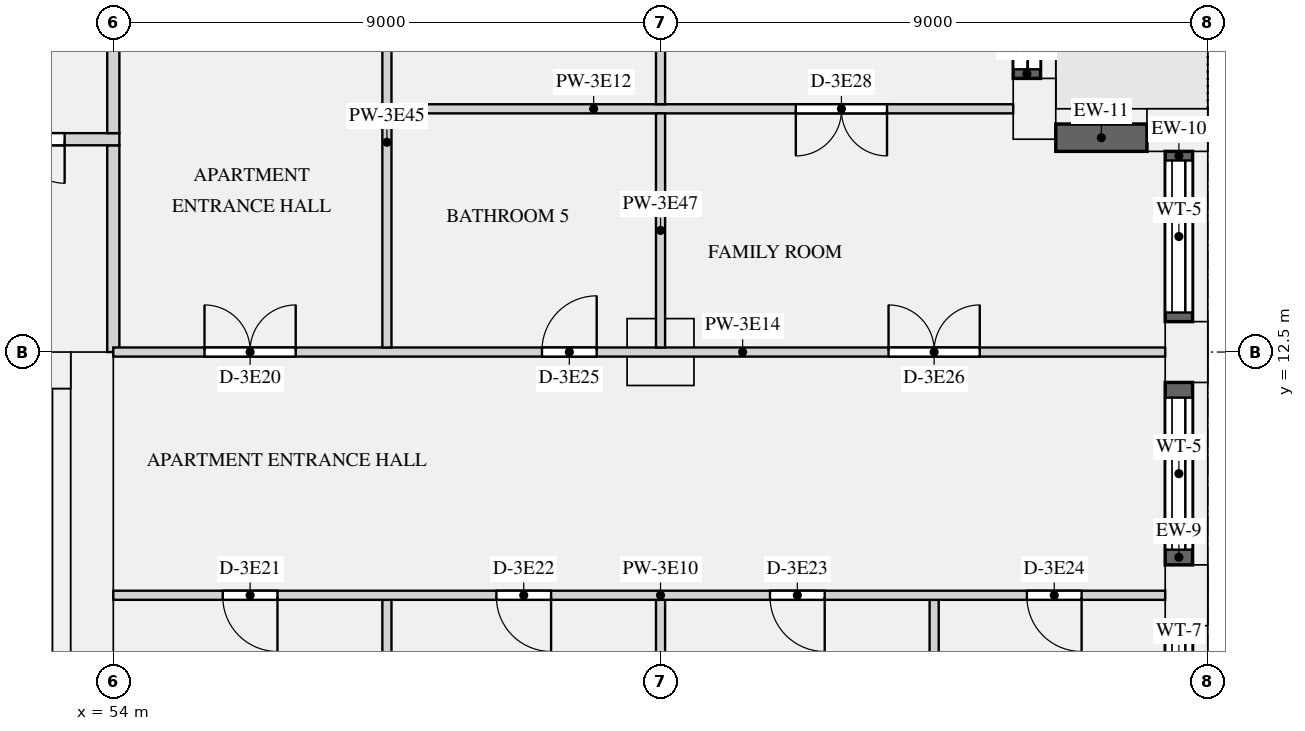
"""IFC4 building model, lengths in metres.
Left out: names, types, materials, properties, quantities, classifications, styles, units other than length and angle.
Written with IfcOpenShell. Run it as: python <this file> out.ifc"""

import sys

from ifc_helpers import new_model, si_unit, direction, frame, frame_2d, origin, origin_2d, place, context, subcontext, project, spatial, rectangle, extrude, element, fill, save


model = new_model("IFC4")
c1 = context("Model", 3, precision=1e-05, world=origin(), true_north=direction((0.0, 1.0)))
c2 = subcontext(c1, "Body", "Model", "MODEL_VIEW")
j1 = project(units=[si_unit("LENGTHUNIT", "METRE"), si_unit("PLANEANGLEUNIT", "RADIAN")], contexts=[c1])
p1 = place(None, origin())
s1 = spatial("IfcSite", under=j1, at=p1, CompositionType="ELEMENT")
p2 = place(p1, origin())
s2 = spatial("IfcBuilding", under=s1, at=p2, CompositionType="ELEMENT")
p3 = place(p2, frame((0.0, 0.0, 172.8)))
s3 = spatial("IfcBuildingStorey", under=s2, at=p3, CompositionType="ELEMENT", Elevation=172.8)
for number, where, z_axis, x_axis in (
    (1, (71.65, 8.5, 0.0), (0.0, 0.0, 1.0), (0.0, 1.0, 0.0)),
    (2, (71.65, 12.5, 0.0), (0.0, 0.0, 1.0), (0.0, 1.0, 0.0)),
    (3, (71.5, 16.15, 0.0), (0.0, 0.0, 1.0), (-1.0, 0.0, 0.0)),
    (4, (69.15, 16.5, 0.0), (0.0, 0.0, 1.0), (0.0, 1.0, 0.0)),
):
    element("IfcColumn", number, at=place(p3, frame(where, z_axis=z_axis, x_axis=x_axis)), inside=s3, PredefinedType="USERDEFINED", context=c2, shape_type="SweptSolid", body=[
        extrude(rectangle(XDim=1.0, YDim=0.7, at=origin_2d()), origin(), (0.0, 0.0, 1.0), 3.15),
    ])
p4 = place(p3, frame((63.0, 12.5, 0.0), z_axis=(0.0, 0.0, 1.0), x_axis=(1.0, 0.0, 0.0)))
e5 = element("IfcColumn", 5, at=p4, inside=s3, PredefinedType="COLUMN", context=c2, shape_type="SweptSolid", body=[
    extrude(rectangle(XDim=1.1, YDim=1.1, at=origin_2d()), origin(), (0.0, 0.0, 1.0), 3.15),
])
p5 = place(p3, frame((53.65, 0.0, 0.0), z_axis=(0.0, 0.0, 1.0), x_axis=(0.0, 1.0, 0.0)))
e6 = element("IfcWall", 6, at=p5, inside=s3, PredefinedType="SHEAR", context=c2, shape_type="SweptSolid", body=[
    extrude(rectangle(XDim=12.5, YDim=0.7, at=frame_2d((6.25, 0.0))), origin(), (0.0, 0.0, 1.0), 3.15),
])
p6 = place(p3, frame((18.7, 12.2, 0.0), z_axis=(0.0, 0.0, 1.0), x_axis=(1.0, 0.0, 0.0)))
e7 = element("IfcWall", 7, at=p6, inside=s3, PredefinedType="SHEAR", context=c2, shape_type="SweptSolid", body=[
    extrude(rectangle(XDim=34.6, YDim=0.6, at=frame_2d((17.3, 0.0))), origin(), (0.0, 0.0, 1.0), 3.15),
])
p7 = place(p6, frame((24.475, 0.0, 0.0)))
e8 = element("IfcOpeningElement", 8, at=p7, cuts=e7, PredefinedType="OPENING", context=c2, shape_type="SweptSolid", body=[
    extrude(rectangle(XDim=1.1, YDim=2.1, at=frame_2d((0.55, 1.05))), frame((0.0, 0.31, 0.0), z_axis=(0.0, -1.0, 0.0), x_axis=(1.0, 0.0, 0.0)), (0.0, 0.0, 1.0), 0.62),
])
p8 = place(p6, frame((26.725, 0.0, 0.0)))
e9 = element("IfcOpeningElement", 9, at=p8, cuts=e7, PredefinedType="OPENING", context=c2, shape_type="SweptSolid", body=[
    extrude(rectangle(XDim=1.1, YDim=2.1, at=frame_2d((0.55, 1.05))), frame((0.0, 0.31, 0.0), z_axis=(0.0, -1.0, 0.0), x_axis=(1.0, 0.0, 0.0)), (0.0, 0.0, 1.0), 0.62),
])
p9 = place(p6, frame((28.975, 0.0, 0.0)))
e10 = element("IfcOpeningElement", 10, at=p9, cuts=e7, PredefinedType="OPENING", context=c2, shape_type="SweptSolid", body=[
    extrude(rectangle(XDim=1.1, YDim=2.1, at=frame_2d((0.55, 1.05))), frame((0.0, 0.31, 0.0), z_axis=(0.0, -1.0, 0.0), x_axis=(1.0, 0.0, 0.0)), (0.0, 0.0, 1.0), 0.62),
])
p10 = place(p6, frame((11.85, 0.0, 0.0)))
e11 = element("IfcOpeningElement", 11, at=p10, cuts=e7, PredefinedType="OPENING", context=c2, shape_type="SweptSolid", body=[
    extrude(rectangle(XDim=0.9, YDim=2.1, at=frame_2d((0.45, 1.05))), frame((0.0, 0.31, 0.0), z_axis=(0.0, -1.0, 0.0), x_axis=(1.0, 0.0, 0.0)), (0.0, 0.0, 1.0), 0.62),
])
p11 = place(p6, frame((18.35, 0.0, 0.0)))
e12 = element("IfcOpeningElement", 12, at=p11, cuts=e7, PredefinedType="OPENING", context=c2, shape_type="SweptSolid", body=[
    extrude(rectangle(XDim=0.9, YDim=2.1, at=frame_2d((0.45, 1.05))), frame((0.0, 0.31, 0.0), z_axis=(0.0, -1.0, 0.0), x_axis=(1.0, 0.0, 0.0)), (0.0, 0.0, 1.0), 0.62),
])
p12 = place(p6, frame((1.45, 0.0, 0.0)))
e13 = element("IfcOpeningElement", 13, at=p12, cuts=e7, PredefinedType="OPENING", context=c2, shape_type="SweptSolid", body=[
    extrude(rectangle(XDim=1.2, YDim=2.1, at=frame_2d((0.6, 1.05))), frame((0.0, 0.31, 0.0), z_axis=(0.0, -1.0, 0.0), x_axis=(1.0, 0.0, 0.0)), (0.0, 0.0, 1.0), 0.62),
])
p13 = place(p6, frame((31.95, 0.0, 0.0)))
e14 = element("IfcOpeningElement", 14, at=p13, cuts=e7, PredefinedType="OPENING", context=c2, shape_type="SweptSolid", body=[
    extrude(rectangle(XDim=1.2, YDim=2.1, at=frame_2d((0.6, 1.05))), frame((0.0, 0.31, 0.0), z_axis=(0.0, -1.0, 0.0), x_axis=(1.0, 0.0, 0.0)), (0.0, 0.0, 1.0), 0.62),
])
p14 = place(p3, frame((53.15, 1.0, 0.0), z_axis=(0.0, 0.0, 1.0), x_axis=(0.0, 1.0, 0.0)))
e15 = element("IfcWall", 15, at=p14, inside=s3, PredefinedType="SHEAR", context=c2, shape_type="SweptSolid", body=[
    extrude(rectangle(XDim=10.9, YDim=0.3, at=frame_2d((5.45, 0.0))), origin(), (0.0, 0.0, 1.0), 3.15),
])
p15 = place(p3, frame((71.525, 5.5, 0.9), z_axis=(0.0, 0.0, 1.0), x_axis=(0.0, 1.0, 0.0)))
e16 = element("IfcWall", 16, at=p15, inside=s3, PredefinedType="SOLIDWALL", context=c2, shape_type="SweptSolid", body=[
    extrude(rectangle(XDim=2.5, YDim=0.45, at=frame_2d((1.25, 0.0))), origin(), (0.0, 0.0, 1.0), 1.93),
])
p16 = place(p15, frame((0.25, 0.0, 0.15)))
e17 = element("IfcOpeningElement", 17, at=p16, cuts=e16, PredefinedType="OPENING", context=c2, shape_type="SweptSolid", body=[
    extrude(rectangle(XDim=2.0, YDim=1.5, at=frame_2d((1.0, 0.75))), frame((0.0, 0.235, 0.0), z_axis=(0.0, -1.0, 0.0), x_axis=(1.0, 0.0, 0.0)), (0.0, 0.0, 1.0), 0.47),
])
p17 = place(p3, frame((71.525, 9.0, 0.9), z_axis=(0.0, 0.0, 1.0), x_axis=(0.0, 1.0, 0.0)))
e18 = element("IfcWall", 18, at=p17, inside=s3, PredefinedType="SOLIDWALL", context=c2, shape_type="SweptSolid", body=[
    extrude(rectangle(XDim=3.0, YDim=0.45, at=frame_2d((1.5, 0.0))), origin(), (0.0, 0.0, 1.0), 1.93),
])
p18 = place(p17, frame((0.25, 0.0, 0.15)))
e19 = element("IfcOpeningElement", 19, at=p18, cuts=e18, PredefinedType="OPENING", context=c2, shape_type="SweptSolid", body=[
    extrude(rectangle(XDim=2.5, YDim=1.5, at=frame_2d((1.25, 0.75))), frame((0.0, 0.235, 0.0), z_axis=(0.0, -1.0, 0.0), x_axis=(1.0, 0.0, 0.0)), (0.0, 0.0, 1.0), 0.47),
])
p19 = place(p3, frame((71.525, 13.0, 0.9), z_axis=(0.0, 0.0, 1.0), x_axis=(0.0, 1.0, 0.0)))
e20 = element("IfcWall", 20, at=p19, inside=s3, PredefinedType="SOLIDWALL", context=c2, shape_type="SweptSolid", body=[
    extrude(rectangle(XDim=2.8, YDim=0.45, at=frame_2d((1.4, 0.0))), origin(), (0.0, 0.0, 1.0), 1.93),
])
p20 = place(p19, frame((0.15, 0.0, 0.15)))
e21 = element("IfcOpeningElement", 21, at=p20, cuts=e20, PredefinedType="OPENING", context=c2, shape_type="SweptSolid", body=[
    extrude(rectangle(XDim=2.5, YDim=1.5, at=frame_2d((1.25, 0.75))), frame((0.0, 0.235, 0.0), z_axis=(0.0, -1.0, 0.0), x_axis=(1.0, 0.0, 0.0)), (0.0, 0.0, 1.0), 0.47),
])
p21 = place(p3, frame((71.0, 16.025, 0.9), z_axis=(0.0, 0.0, 1.0), x_axis=(-1.0, 0.0, 0.0)))
e22 = element("IfcWall", 22, at=p21, inside=s3, PredefinedType="SOLIDWALL", context=c2, shape_type="SweptSolid", body=[
    extrude(rectangle(XDim=1.5, YDim=0.45, at=frame_2d((0.75, 0.0))), origin(), (0.0, 0.0, 1.0), 1.93),
])
p22 = place(p3, frame((69.025, 17.0, 0.0), z_axis=(0.0, 0.0, 1.0), x_axis=(0.0, 1.0, 0.0)))
e23 = element("IfcWall", 23, at=p22, inside=s3, PredefinedType="SOLIDWALL", context=c2, shape_type="SweptSolid", body=[
    extrude(rectangle(XDim=3.0, YDim=0.45, at=frame_2d((1.5, 0.0))), origin(), (0.0, 0.0, 1.0), 2.83),
])
p23 = place(p22, frame((0.15, 0.0, 0.0)))
e24 = element("IfcOpeningElement", 24, at=p23, cuts=e23, PredefinedType="OPENING", context=c2, shape_type="SweptSolid", body=[
    extrude(rectangle(XDim=2.7, YDim=2.3, at=frame_2d((1.35, 1.15))), frame((0.0, 0.235, 0.0), z_axis=(0.0, -1.0, 0.0), x_axis=(1.0, 0.0, 0.0)), (0.0, 0.0, 1.0), 0.47),
])
p24 = place(p3, frame((54.0, 12.5, 0.0), z_axis=(0.0, 0.0, 1.0), x_axis=(0.0, 1.0, 0.0)))
e25 = element("IfcWall", 25, at=p24, inside=s3, PredefinedType="PARTITIONING", context=c2, shape_type="SweptSolid", body=[
    extrude(rectangle(XDim=3.4, YDim=0.2, at=frame_2d((1.7, 0.0))), origin(), (0.0, 0.0, 1.0), 2.83),
])
p25 = place(p3, frame((54.0, 8.5, 0.0), z_axis=(0.0, 0.0, 1.0), x_axis=(1.0, 0.0, 0.0)))
e26 = element("IfcWall", 26, at=p25, inside=s3, PredefinedType="PARTITIONING", context=c2, shape_type="SweptSolid", body=[
    extrude(rectangle(XDim=17.3, YDim=0.15, at=frame_2d((8.65, 0.0))), origin(), (0.0, 0.0, 1.0), 2.83),
])
p26 = place(p25, frame((1.8, 0.0, 0.0)))
e27 = element("IfcOpeningElement", 27, at=p26, cuts=e26, PredefinedType="OPENING", context=c2, shape_type="SweptSolid", body=[
    extrude(rectangle(XDim=0.9, YDim=2.1, at=frame_2d((0.45, 1.05))), frame((0.0, 0.085, 0.0), z_axis=(0.0, -1.0, 0.0), x_axis=(1.0, 0.0, 0.0)), (0.0, 0.0, 1.0), 0.17),
])
p27 = place(p25, frame((6.3, 0.0, 0.0)))
e28 = element("IfcOpeningElement", 28, at=p27, cuts=e26, PredefinedType="OPENING", context=c2, shape_type="SweptSolid", body=[
    extrude(rectangle(XDim=0.9, YDim=2.1, at=frame_2d((0.45, 1.05))), frame((0.0, 0.085, 0.0), z_axis=(0.0, -1.0, 0.0), x_axis=(1.0, 0.0, 0.0)), (0.0, 0.0, 1.0), 0.17),
])
p28 = place(p25, frame((10.8, 0.0, 0.0)))
e29 = element("IfcOpeningElement", 29, at=p28, cuts=e26, PredefinedType="OPENING", context=c2, shape_type="SweptSolid", body=[
    extrude(rectangle(XDim=0.9, YDim=2.1, at=frame_2d((0.45, 1.05))), frame((0.0, 0.085, 0.0), z_axis=(0.0, -1.0, 0.0), x_axis=(1.0, 0.0, 0.0)), (0.0, 0.0, 1.0), 0.17),
])
p29 = place(p25, frame((15.025, 0.0, 0.0)))
e30 = element("IfcOpeningElement", 30, at=p29, cuts=e26, PredefinedType="OPENING", context=c2, shape_type="SweptSolid", body=[
    extrude(rectangle(XDim=0.9, YDim=2.1, at=frame_2d((0.45, 1.05))), frame((0.0, 0.085, 0.0), z_axis=(0.0, -1.0, 0.0), x_axis=(1.0, 0.0, 0.0)), (0.0, 0.0, 1.0), 0.17),
])
p30 = place(p3, frame((58.575, 16.5, 0.0), z_axis=(0.0, 0.0, 1.0), x_axis=(1.0, 0.0, 0.0)))
e31 = element("IfcWall", 31, at=p30, inside=s3, PredefinedType="PARTITIONING", context=c2, shape_type="SweptSolid", body=[
    extrude(rectangle(XDim=10.225, YDim=0.15, at=frame_2d((5.113, 0.0))), origin(), (0.0, 0.0, 1.0), 2.83),
])
p31 = place(p30, frame((6.65, 0.0, 0.0)))
e32 = element("IfcOpeningElement", 32, at=p31, cuts=e31, PredefinedType="OPENING", context=c2, shape_type="SweptSolid", body=[
    extrude(rectangle(XDim=1.5, YDim=2.1, at=frame_2d((0.75, 1.05))), frame((0.0, 0.085, 0.0), z_axis=(0.0, -1.0, 0.0), x_axis=(1.0, 0.0, 0.0)), (0.0, 0.0, 1.0), 0.17),
])
p32 = place(p3, frame((54.0, 12.5, 0.0), z_axis=(0.0, 0.0, 1.0), x_axis=(1.0, 0.0, 0.0)))
e33 = element("IfcWall", 33, at=p32, inside=s3, PredefinedType="PARTITIONING", context=c2, shape_type="SweptSolid", body=[
    extrude(rectangle(XDim=17.3, YDim=0.15, at=frame_2d((8.65, 0.0))), origin(), (0.0, 0.0, 1.0), 2.83),
])
p33 = place(p32, frame((1.5, 0.0, 0.0)))
e34 = element("IfcOpeningElement", 34, at=p33, cuts=e33, PredefinedType="OPENING", context=c2, shape_type="SweptSolid", body=[
    extrude(rectangle(XDim=1.5, YDim=2.1, at=frame_2d((0.75, 1.05))), frame((0.0, 0.085, 0.0), z_axis=(0.0, -1.0, 0.0), x_axis=(1.0, 0.0, 0.0)), (0.0, 0.0, 1.0), 0.17),
])
p34 = place(p32, frame((7.05, 0.0, 0.0)))
e35 = element("IfcOpeningElement", 35, at=p34, cuts=e33, PredefinedType="OPENING", context=c2, shape_type="SweptSolid", body=[
    extrude(rectangle(XDim=0.9, YDim=2.1, at=frame_2d((0.45, 1.05))), frame((0.0, 0.085, 0.0), z_axis=(0.0, -1.0, 0.0), x_axis=(1.0, 0.0, 0.0)), (0.0, 0.0, 1.0), 0.17),
])
p35 = place(p32, frame((12.75, 0.0, 0.0)))
e36 = element("IfcOpeningElement", 36, at=p35, cuts=e33, PredefinedType="OPENING", context=c2, shape_type="SweptSolid", body=[
    extrude(rectangle(XDim=1.5, YDim=2.1, at=frame_2d((0.75, 1.05))), frame((0.0, 0.085, 0.0), z_axis=(0.0, -1.0, 0.0), x_axis=(1.0, 0.0, 0.0)), (0.0, 0.0, 1.0), 0.17),
])
p36 = place(p3, frame((17.9, 16.0, 0.0), z_axis=(0.0, 0.0, 1.0), x_axis=(1.0, 0.0, 0.0)))
e37 = element("IfcWall", 37, at=p36, inside=s3, PredefinedType="PARTITIONING", context=c2, shape_type="SweptSolid", body=[
    extrude(rectangle(XDim=36.2, YDim=0.2, at=frame_2d((18.1, 0.0))), origin(), (0.0, 0.0, 1.0), 2.83),
])
p37 = place(p36, frame((0.9, 0.0, 0.0)))
e38 = element("IfcOpeningElement", 38, at=p37, cuts=e37, PredefinedType="OPENING", context=c2, shape_type="SweptSolid", body=[
    extrude(rectangle(XDim=1.4, YDim=2.1, at=frame_2d((0.7, 1.05))), frame((0.0, 0.11, 0.0), z_axis=(0.0, -1.0, 0.0), x_axis=(1.0, 0.0, 0.0)), (0.0, 0.0, 1.0), 0.22),
])
p38 = place(p36, frame((33.9, 0.0, 0.0)))
e39 = element("IfcOpeningElement", 39, at=p38, cuts=e37, PredefinedType="OPENING", context=c2, shape_type="SweptSolid", body=[
    extrude(rectangle(XDim=1.4, YDim=2.1, at=frame_2d((0.7, 1.05))), frame((0.0, 0.11, 0.0), z_axis=(0.0, -1.0, 0.0), x_axis=(1.0, 0.0, 0.0)), (0.0, 0.0, 1.0), 0.22),
])
p39 = place(p3, frame((54.0, 16.1, 0.0), z_axis=(0.0, 0.0, 1.0), x_axis=(0.0, 1.0, 0.0)))
e40 = element("IfcWall", 40, at=p39, inside=s3, PredefinedType="PARTITIONING", context=c2, shape_type="SweptSolid", body=[
    extrude(rectangle(XDim=7.8, YDim=0.2, at=frame_2d((3.9, 0.0))), origin(), (0.0, 0.0, 1.0), 2.83),
])
p40 = place(p39, frame((1.85, 0.0, 0.0)))
e41 = element("IfcOpeningElement", 41, at=p40, cuts=e40, PredefinedType="OPENING", context=c2, shape_type="SweptSolid", body=[
    extrude(rectangle(XDim=1.1, YDim=2.1, at=frame_2d((0.55, 1.05))), frame((0.0, 0.11, 0.0), z_axis=(0.0, -1.0, 0.0), x_axis=(1.0, 0.0, 0.0)), (0.0, 0.0, 1.0), 0.22),
])
p41 = place(p3, frame((58.5, 0.7, 0.0), z_axis=(0.0, 0.0, 1.0), x_axis=(0.0, 1.0, 0.0)))
e42 = element("IfcWall", 42, at=p41, inside=s3, PredefinedType="PARTITIONING", context=c2, shape_type="SweptSolid", body=[
    extrude(rectangle(XDim=7.725, YDim=0.15, at=frame_2d((3.863, 0.0))), origin(), (0.0, 0.0, 1.0), 2.83),
])
p42 = place(p3, frame((58.5, 12.575, 0.0), z_axis=(0.0, 0.0, 1.0), x_axis=(0.0, 1.0, 0.0)))
e43 = element("IfcWall", 43, at=p42, inside=s3, PredefinedType="PARTITIONING", context=c2, shape_type="SweptSolid", body=[
    extrude(rectangle(XDim=10.325, YDim=0.15, at=frame_2d((5.163, 0.0))), origin(), (0.0, 0.0, 1.0), 2.83),
])
p43 = place(p42, frame((6.75, 0.0, 0.0)))
e44 = element("IfcOpeningElement", 44, at=p43, cuts=e43, PredefinedType="OPENING", context=c2, shape_type="SweptSolid", body=[
    extrude(rectangle(XDim=0.9, YDim=2.1, at=frame_2d((0.45, 1.05))), frame((0.0, 0.085, 0.0), z_axis=(0.0, -1.0, 0.0), x_axis=(1.0, 0.0, 0.0)), (0.0, 0.0, 1.0), 0.17),
])
p44 = place(p3, frame((63.0, 0.7, 0.0), z_axis=(0.0, 0.0, 1.0), x_axis=(0.0, 1.0, 0.0)))
e45 = element("IfcWall", 45, at=p44, inside=s3, PredefinedType="PARTITIONING", context=c2, shape_type="SweptSolid", body=[
    extrude(rectangle(XDim=7.725, YDim=0.15, at=frame_2d((3.863, 0.0))), origin(), (0.0, 0.0, 1.0), 2.83),
])
p45 = place(p3, frame((63.0, 12.575, 0.0), z_axis=(0.0, 0.0, 1.0), x_axis=(0.0, 1.0, 0.0)))
e46 = element("IfcWall", 46, at=p45, inside=s3, PredefinedType="PARTITIONING", context=c2, shape_type="SweptSolid", body=[
    extrude(rectangle(XDim=3.85, YDim=0.15, at=frame_2d((1.925, 0.0))), origin(), (0.0, 0.0, 1.0), 2.83),
])
p46 = place(p3, frame((63.0, 16.575, 0.0), z_axis=(0.0, 0.0, 1.0), x_axis=(0.0, 1.0, 0.0)))
e47 = element("IfcWall", 47, at=p46, inside=s3, PredefinedType="PARTITIONING", context=c2, shape_type="SweptSolid", body=[
    extrude(rectangle(XDim=7.85, YDim=0.15, at=frame_2d((3.925, 0.0))), origin(), (0.0, 0.0, 1.0), 2.83),
])
p47 = place(p46, frame((2.95, 0.0, 0.0)))
e48 = element("IfcOpeningElement", 48, at=p47, cuts=e47, PredefinedType="OPENING", context=c2, shape_type="SweptSolid", body=[
    extrude(rectangle(XDim=0.9, YDim=2.1, at=frame_2d((0.45, 1.05))), frame((0.0, 0.085, 0.0), z_axis=(0.0, -1.0, 0.0), x_axis=(1.0, 0.0, 0.0)), (0.0, 0.0, 1.0), 0.17),
])
p48 = place(p3, frame((67.5, 5.2, 0.0), z_axis=(0.0, 0.0, 1.0), x_axis=(0.0, 1.0, 0.0)))
e49 = element("IfcWall", 49, at=p48, inside=s3, PredefinedType="PARTITIONING", context=c2, shape_type="SweptSolid", body=[
    extrude(rectangle(XDim=3.225, YDim=0.15, at=frame_2d((1.613, 0.0))), origin(), (0.0, 0.0, 1.0), 2.83),
])
p49 = place(p16, origin())
e50 = element("IfcWindow", 50, at=p49, inside=s3, PartitioningType="SINGLE_PANEL", PredefinedType="WINDOW", context=c2, shape_type="SweptSolid", body=[
    extrude(rectangle(XDim=2.0, YDim=1.5, at=frame_2d((1.0, 0.75))), frame((0.0, -0.065, 0.0), z_axis=(0.0, -1.0, 0.0), x_axis=(1.0, 0.0, 0.0)), (0.0, 0.0, 1.0), 0.06),
])
fill(e17, e50)
p50 = place(p18, origin())
e51 = element("IfcWindow", 51, at=p50, inside=s3, PartitioningType="SINGLE_PANEL", PredefinedType="WINDOW", context=c2, shape_type="SweptSolid", body=[
    extrude(rectangle(XDim=2.5, YDim=1.5, at=frame_2d((1.25, 0.75))), frame((0.0, -0.065, 0.0), z_axis=(0.0, -1.0, 0.0), x_axis=(1.0, 0.0, 0.0)), (0.0, 0.0, 1.0), 0.06),
])
fill(e19, e51)
p51 = place(p20, origin())
e52 = element("IfcWindow", 52, at=p51, inside=s3, PartitioningType="SINGLE_PANEL", PredefinedType="WINDOW", context=c2, shape_type="SweptSolid", body=[
    extrude(rectangle(XDim=2.5, YDim=1.5, at=frame_2d((1.25, 0.75))), frame((0.0, -0.065, 0.0), z_axis=(0.0, -1.0, 0.0), x_axis=(1.0, 0.0, 0.0)), (0.0, 0.0, 1.0), 0.06),
])
fill(e21, e52)
p52 = place(p23, origin())
e53 = element("IfcDoor", 53, at=p52, inside=s3, OperationType="SLIDING_TO_LEFT", PredefinedType="DOOR", context=c2, shape_type="SweptSolid", body=[
    extrude(rectangle(XDim=2.7, YDim=2.3, at=frame_2d((1.35, 1.15))), frame((0.0, -0.07, 0.0), z_axis=(0.0, -1.0, 0.0), x_axis=(1.0, 0.0, 0.0)), (0.0, 0.0, 1.0), 0.05),
])
fill(e24, e53)
p53 = place(p38, frame((1.4, 0.0, 0.0), z_axis=(0.0, 0.0, 1.0), x_axis=(-1.0, 0.0, 0.0)))
e54 = element("IfcDoor", 54, at=p53, inside=s3, OperationType="DOUBLE_DOOR_SINGLE_SWING", PredefinedType="DOOR", context=c2, shape_type="SweptSolid", body=[
    extrude(rectangle(XDim=1.4, YDim=2.1, at=frame_2d((0.7, 1.05))), frame((0.0, 0.025, 0.0), z_axis=(0.0, -1.0, 0.0), x_axis=(1.0, 0.0, 0.0)), (0.0, 0.0, 1.0), 0.05),
])
fill(e39, e54)
p54 = place(p33, origin())
e55 = element("IfcDoor", 55, at=p54, inside=s3, OperationType="DOUBLE_DOOR_SINGLE_SWING", PredefinedType="DOOR", context=c2, shape_type="SweptSolid", body=[
    extrude(rectangle(XDim=1.5, YDim=2.1, at=frame_2d((0.75, 1.05))), frame((0.0, 0.025, 0.0), z_axis=(0.0, -1.0, 0.0), x_axis=(1.0, 0.0, 0.0)), (0.0, 0.0, 1.0), 0.05),
])
fill(e34, e55)
p55 = place(p26, frame((0.9, 0.0, 0.0), z_axis=(0.0, 0.0, 1.0), x_axis=(-1.0, 0.0, 0.0)))
e56 = element("IfcDoor", 56, at=p55, inside=s3, OperationType="SINGLE_SWING_LEFT", PredefinedType="DOOR", context=c2, shape_type="SweptSolid", body=[
    extrude(rectangle(XDim=0.9, YDim=2.1, at=frame_2d((0.45, 1.05))), frame((0.0, 0.025, 0.0), z_axis=(0.0, -1.0, 0.0), x_axis=(1.0, 0.0, 0.0)), (0.0, 0.0, 1.0), 0.05),
])
fill(e27, e56)
p56 = place(p27, frame((0.9, 0.0, 0.0), z_axis=(0.0, 0.0, 1.0), x_axis=(-1.0, 0.0, 0.0)))
e57 = element("IfcDoor", 57, at=p56, inside=s3, OperationType="SINGLE_SWING_LEFT", PredefinedType="DOOR", context=c2, shape_type="SweptSolid", body=[
    extrude(rectangle(XDim=0.9, YDim=2.1, at=frame_2d((0.45, 1.05))), frame((0.0, 0.025, 0.0), z_axis=(0.0, -1.0, 0.0), x_axis=(1.0, 0.0, 0.0)), (0.0, 0.0, 1.0), 0.05),
])
fill(e28, e57)
p57 = place(p28, frame((0.9, 0.0, 0.0), z_axis=(0.0, 0.0, 1.0), x_axis=(-1.0, 0.0, 0.0)))
e58 = element("IfcDoor", 58, at=p57, inside=s3, OperationType="SINGLE_SWING_LEFT", PredefinedType="DOOR", context=c2, shape_type="SweptSolid", body=[
    extrude(rectangle(XDim=0.9, YDim=2.1, at=frame_2d((0.45, 1.05))), frame((0.0, 0.025, 0.0), z_axis=(0.0, -1.0, 0.0), x_axis=(1.0, 0.0, 0.0)), (0.0, 0.0, 1.0), 0.05),
])
fill(e29, e58)
p58 = place(p29, frame((0.9, 0.0, 0.0), z_axis=(0.0, 0.0, 1.0), x_axis=(-1.0, 0.0, 0.0)))
e59 = element("IfcDoor", 59, at=p58, inside=s3, OperationType="SINGLE_SWING_LEFT", PredefinedType="DOOR", context=c2, shape_type="SweptSolid", body=[
    extrude(rectangle(XDim=0.9, YDim=2.1, at=frame_2d((0.45, 1.05))), frame((0.0, 0.025, 0.0), z_axis=(0.0, -1.0, 0.0), x_axis=(1.0, 0.0, 0.0)), (0.0, 0.0, 1.0), 0.05),
])
fill(e30, e59)
p59 = place(p34, origin())
e60 = element("IfcDoor", 60, at=p59, inside=s3, OperationType="SINGLE_SWING_RIGHT", PredefinedType="DOOR", context=c2, shape_type="SweptSolid", body=[
    extrude(rectangle(XDim=0.9, YDim=2.1, at=frame_2d((0.45, 1.05))), frame((0.0, 0.025, 0.0), z_axis=(0.0, -1.0, 0.0), x_axis=(1.0, 0.0, 0.0)), (0.0, 0.0, 1.0), 0.05),
])
fill(e35, e60)
p60 = place(p35, origin())
e61 = element("IfcDoor", 61, at=p60, inside=s3, OperationType="DOUBLE_DOOR_SINGLE_SWING", PredefinedType="DOOR", context=c2, shape_type="SweptSolid", body=[
    extrude(rectangle(XDim=1.5, YDim=2.1, at=frame_2d((0.75, 1.05))), frame((0.0, 0.025, 0.0), z_axis=(0.0, -1.0, 0.0), x_axis=(1.0, 0.0, 0.0)), (0.0, 0.0, 1.0), 0.05),
])
fill(e36, e61)
p61 = place(p31, frame((1.5, 0.0, 0.0), z_axis=(0.0, 0.0, 1.0), x_axis=(-1.0, 0.0, 0.0)))
e62 = element("IfcDoor", 62, at=p61, inside=s3, OperationType="DOUBLE_DOOR_SINGLE_SWING", PredefinedType="DOOR", context=c2, shape_type="SweptSolid", body=[
    extrude(rectangle(XDim=1.5, YDim=2.1, at=frame_2d((0.75, 1.05))), frame((0.0, 0.025, 0.0), z_axis=(0.0, -1.0, 0.0), x_axis=(1.0, 0.0, 0.0)), (0.0, 0.0, 1.0), 0.05),
])
fill(e32, e62)
save(model, sys.argv[1])
